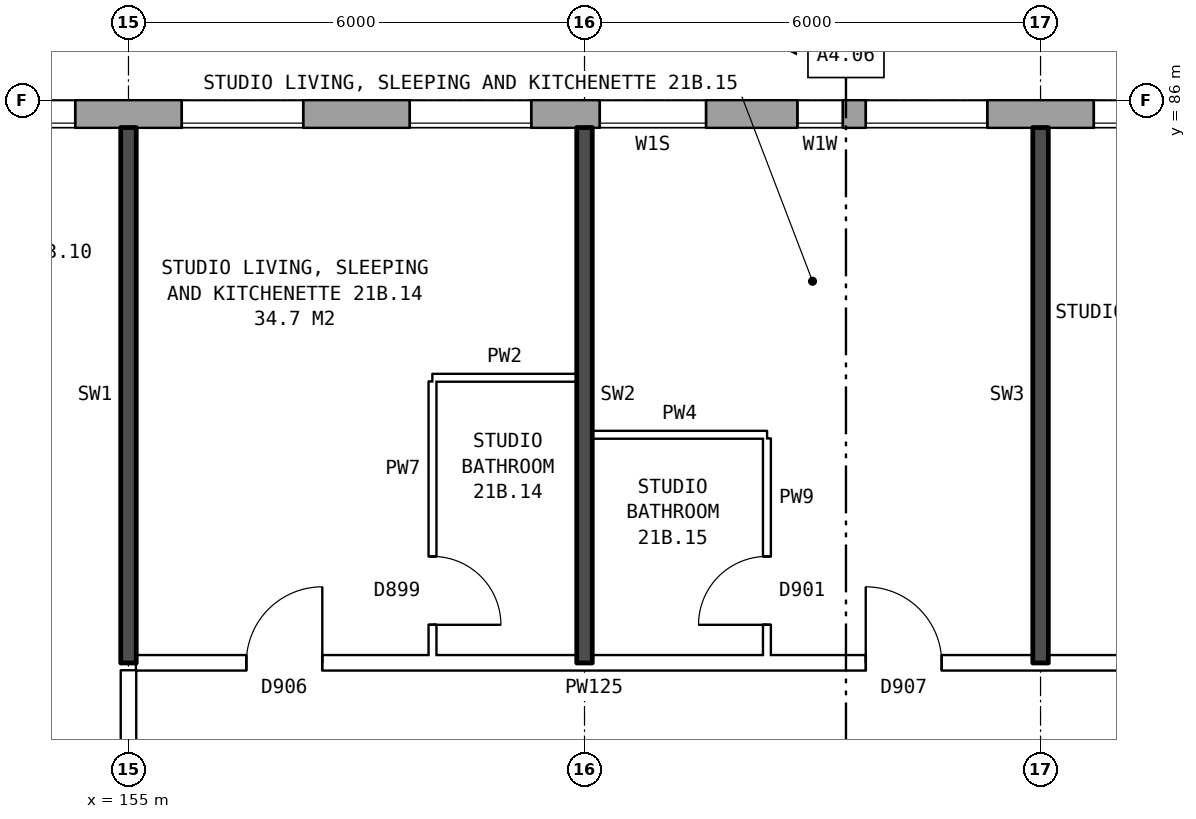
"""IFC4 building model, lengths in metres.
Left out: names, types, materials, properties, quantities, classifications, styles, units other than length and angle.
Written with IfcOpenShell. Run it as: python <this file> out.ifc"""

import sys

from ifc_helpers import new_model, si_unit, direction, frame, frame_2d, origin, place, context, subcontext, project, spatial, rectangle, extrude, element, fill, save


model = new_model("IFC4")
c1 = context("Model", 3, precision=1e-05, world=origin(), true_north=direction((0.0, 1.0)))
c2 = subcontext(c1, "Body", "Model", "MODEL_VIEW")
j1 = project(units=[si_unit("LENGTHUNIT", "METRE"), si_unit("PLANEANGLEUNIT", "RADIAN")], contexts=[c1])
p1 = place(None, origin())
s1 = spatial("IfcSite", under=j1, at=p1, CompositionType="ELEMENT")
p2 = place(p1, origin())
s2 = spatial("IfcBuilding", under=s1, at=p2, CompositionType="ELEMENT")
p3 = place(p2, frame((0.0, 0.0, 77.8)))
s3 = spatial("IfcBuildingStorey", under=s2, at=p3, CompositionType="ELEMENT", Elevation=77.8)
p4 = place(p3, frame((172.175, 85.82, 0.0), z_axis=(0.0, 0.0, 1.0), x_axis=(-1.0, 0.0, 0.0)))
e1 = element("IfcWall", 1, at=p4, inside=s3, PredefinedType="STANDARD", context=c2, shape_type="SweptSolid", body=[
    extrude(rectangle(XDim=38.101, YDim=0.36, at=frame_2d((19.05, 0.0))), origin(), (0.0, 0.0, 1.0), 2.85),
])
p5 = place(p4, frame((2.875, 0.0, 0.8)))
e2 = element("IfcOpeningElement", 2, at=p5, cuts=e1, PredefinedType="OPENING", context=c2, shape_type="SweptSolid", body=[
    extrude(rectangle(XDim=1.6, YDim=1.8, at=frame_2d((0.8, 0.9))), frame((0.0, 0.19, 0.0), z_axis=(0.0, -1.0, 0.0), x_axis=(1.0, 0.0, 0.0)), (0.0, 0.0, 1.0), 0.38),
])
p6 = place(p4, frame((5.875, 0.0, 0.8)))
e3 = element("IfcOpeningElement", 3, at=p6, cuts=e1, PredefinedType="OPENING", context=c2, shape_type="SweptSolid", body=[
    extrude(rectangle(XDim=1.6, YDim=1.8, at=frame_2d((0.8, 0.9))), frame((0.0, 0.19, 0.0), z_axis=(0.0, -1.0, 0.0), x_axis=(1.0, 0.0, 0.0)), (0.0, 0.0, 1.0), 0.38),
])
p7 = place(p4, frame((7.775, 0.0, 1.7)))
e4 = element("IfcOpeningElement", 4, at=p7, cuts=e1, PredefinedType="OPENING", context=c2, shape_type="SweptSolid", body=[
    extrude(rectangle(XDim=0.6, YDim=0.9, at=frame_2d((0.3, 0.45))), frame((0.0, 0.19, 0.0), z_axis=(0.0, -1.0, 0.0), x_axis=(1.0, 0.0, 0.0)), (0.0, 0.0, 1.0), 0.38),
])
p8 = place(p4, frame((11.875, 0.0, 0.8)))
e5 = element("IfcOpeningElement", 5, at=p8, cuts=e1, PredefinedType="OPENING", context=c2, shape_type="SweptSolid", body=[
    extrude(rectangle(XDim=1.6, YDim=1.8, at=frame_2d((0.8, 0.9))), frame((0.0, 0.19, 0.0), z_axis=(0.0, -1.0, 0.0), x_axis=(1.0, 0.0, 0.0)), (0.0, 0.0, 1.0), 0.38),
])
p9 = place(p4, frame((14.875, 0.0, 0.8)))
e6 = element("IfcOpeningElement", 6, at=p9, cuts=e1, PredefinedType="OPENING", context=c2, shape_type="SweptSolid", body=[
    extrude(rectangle(XDim=1.6, YDim=1.8, at=frame_2d((0.8, 0.9))), frame((0.0, 0.19, 0.0), z_axis=(0.0, -1.0, 0.0), x_axis=(1.0, 0.0, 0.0)), (0.0, 0.0, 1.0), 0.38),
])
p10 = place(p4, frame((17.875, 0.0, 0.8)))
e7 = element("IfcOpeningElement", 7, at=p10, cuts=e1, PredefinedType="OPENING", context=c2, shape_type="SweptSolid", body=[
    extrude(rectangle(XDim=1.6, YDim=1.8, at=frame_2d((0.8, 0.9))), frame((0.0, 0.19, 0.0), z_axis=(0.0, -1.0, 0.0), x_axis=(1.0, 0.0, 0.0)), (0.0, 0.0, 1.0), 0.38),
])
p11 = place(p4, frame((20.875, 0.0, 0.8)))
e8 = element("IfcOpeningElement", 8, at=p11, cuts=e1, PredefinedType="OPENING", context=c2, shape_type="SweptSolid", body=[
    extrude(rectangle(XDim=1.6, YDim=1.8, at=frame_2d((0.8, 0.9))), frame((0.0, 0.19, 0.0), z_axis=(0.0, -1.0, 0.0), x_axis=(1.0, 0.0, 0.0)), (0.0, 0.0, 1.0), 0.38),
])
p12 = place(p4, frame((23.875, 0.0, 0.8)))
e9 = element("IfcOpeningElement", 9, at=p12, cuts=e1, PredefinedType="OPENING", context=c2, shape_type="SweptSolid", body=[
    extrude(rectangle(XDim=1.6, YDim=1.8, at=frame_2d((0.8, 0.9))), frame((0.0, 0.19, 0.0), z_axis=(0.0, -1.0, 0.0), x_axis=(1.0, 0.0, 0.0)), (0.0, 0.0, 1.0), 0.38),
])
p13 = place(p4, frame((26.325, 0.0, 0.65)))
e10 = element("IfcOpeningElement", 10, at=p13, cuts=e1, PredefinedType="OPENING", context=c2, shape_type="SweptSolid", body=[
    extrude(rectangle(XDim=1.4, YDim=1.8, at=frame_2d((0.7, 0.9))), frame((0.0, 0.19, 0.0), z_axis=(0.0, -1.0, 0.0), x_axis=(1.0, 0.0, 0.0)), (0.0, 0.0, 1.0), 0.38),
])
p14 = place(p4, frame((29.675, 0.0, 1.7)))
e11 = element("IfcOpeningElement", 11, at=p14, cuts=e1, PredefinedType="OPENING", context=c2, shape_type="SweptSolid", body=[
    extrude(rectangle(XDim=0.8, YDim=0.9, at=frame_2d((0.4, 0.45))), frame((0.0, 0.19, 0.0), z_axis=(0.0, -1.0, 0.0), x_axis=(1.0, 0.0, 0.0)), (0.0, 0.0, 1.0), 0.38),
])
p15 = place(p4, frame((32.875, 0.0, 0.8)))
e12 = element("IfcOpeningElement", 12, at=p15, cuts=e1, PredefinedType="OPENING", context=c2, shape_type="SweptSolid", body=[
    extrude(rectangle(XDim=1.6, YDim=1.8, at=frame_2d((0.8, 0.9))), frame((0.0, 0.19, 0.0), z_axis=(0.0, -1.0, 0.0), x_axis=(1.0, 0.0, 0.0)), (0.0, 0.0, 1.0), 0.38),
])
p16 = place(p4, frame((35.875, 0.0, 0.8)))
e13 = element("IfcOpeningElement", 13, at=p16, cuts=e1, PredefinedType="OPENING", context=c2, shape_type="SweptSolid", body=[
    extrude(rectangle(XDim=1.6, YDim=1.8, at=frame_2d((0.8, 0.9))), frame((0.0, 0.19, 0.0), z_axis=(0.0, -1.0, 0.0), x_axis=(1.0, 0.0, 0.0)), (0.0, 0.0, 1.0), 0.38),
])
p17 = place(p4, frame((9.575, 0.0, 0.8)))
e14 = element("IfcOpeningElement", 14, at=p17, cuts=e1, PredefinedType="OPENING", context=c2, shape_type="SweptSolid", body=[
    extrude(rectangle(XDim=1.4, YDim=0.9, at=frame_2d((0.7, 0.45))), frame((0.0, 0.19, 0.0), z_axis=(0.0, -1.0, 0.0), x_axis=(1.0, 0.0, 0.0)), (0.0, 0.0, 1.0), 0.38),
])
p18 = place(p4, frame((28.025, 0.0, 0.65)))
e15 = element("IfcOpeningElement", 15, at=p18, cuts=e1, PredefinedType="OPENING", context=c2, shape_type="SweptSolid", body=[
    extrude(rectangle(XDim=0.6, YDim=0.9, at=frame_2d((0.3, 0.45))), frame((0.0, 0.19, 0.0), z_axis=(0.0, -1.0, 0.0), x_axis=(1.0, 0.0, 0.0)), (0.0, 0.0, 1.0), 0.38),
])
p19 = place(p4, frame((30.775, 0.0, 0.8)))
e16 = element("IfcOpeningElement", 16, at=p19, cuts=e1, PredefinedType="OPENING", context=c2, shape_type="SweptSolid", body=[
    extrude(rectangle(XDim=1.6, YDim=1.8, at=frame_2d((0.8, 0.9))), frame((0.0, 0.19, 0.0), z_axis=(0.0, -1.0, 0.0), x_axis=(1.0, 0.0, 0.0)), (0.0, 0.0, 1.0), 0.38),
])
p20 = place(p3, frame((155.1, 78.6, 0.0), z_axis=(0.0, 0.0, 1.0), x_axis=(1.0, 0.0, 0.0)))
e17 = element("IfcWall", 17, at=p20, inside=s3, PredefinedType="PARTITIONING", context=c2, shape_type="SweptSolid", body=[
    extrude(rectangle(XDim=19.79, YDim=0.2, at=frame_2d((9.895, 0.0))), origin(), (0.0, 0.0, 1.0), 2.85),
])
p21 = place(p20, frame((1.45, 0.0, 0.0)))
e18 = element("IfcOpeningElement", 18, at=p21, cuts=e17, PredefinedType="OPENING", context=c2, shape_type="SweptSolid", body=[
    extrude(rectangle(XDim=1.0, YDim=2.1, at=frame_2d((0.5, 1.05))), frame((0.0, 0.11, 0.0), z_axis=(0.0, -1.0, 0.0), x_axis=(1.0, 0.0, 0.0)), (0.0, 0.0, 1.0), 0.22),
])
p22 = place(p20, frame((9.6, 0.0, 0.0)))
e19 = element("IfcOpeningElement", 19, at=p22, cuts=e17, PredefinedType="OPENING", context=c2, shape_type="SweptSolid", body=[
    extrude(rectangle(XDim=1.0, YDim=2.1, at=frame_2d((0.5, 1.05))), frame((0.0, 0.11, 0.0), z_axis=(0.0, -1.0, 0.0), x_axis=(1.0, 0.0, 0.0)), (0.0, 0.0, 1.0), 0.22),
])
p23 = place(p20, frame((13.2, 0.0, 0.0)))
e20 = element("IfcOpeningElement", 20, at=p23, cuts=e17, PredefinedType="OPENING", context=c2, shape_type="SweptSolid", body=[
    extrude(rectangle(XDim=1.0, YDim=2.1, at=frame_2d((0.5, 1.05))), frame((0.0, 0.11, 0.0), z_axis=(0.0, -1.0, 0.0), x_axis=(1.0, 0.0, 0.0)), (0.0, 0.0, 1.0), 0.22),
])
p24 = place(p3, frame((161.1, 81.6, 0.0), z_axis=(0.0, 0.0, 1.0), x_axis=(1.0, 0.0, 0.0)))
e21 = element("IfcWall", 21, at=p24, inside=s3, PredefinedType="PARTITIONING", context=c2, shape_type="SweptSolid", body=[
    extrude(rectangle(XDim=2.3, YDim=0.1, at=frame_2d((1.15, 0.0))), origin(), (0.0, 0.0, 1.0), 2.85),
])
p25 = place(p3, frame((159.0, 82.35, 0.0), z_axis=(0.0, 0.0, 1.0), x_axis=(1.0, 0.0, 0.0)))
e22 = element("IfcWall", 22, at=p25, inside=s3, PredefinedType="PARTITIONING", context=c2, shape_type="SweptSolid", body=[
    extrude(rectangle(XDim=1.9, YDim=0.1, at=frame_2d((0.95, 0.0))), origin(), (0.0, 0.0, 1.0), 2.85),
])
p26 = place(p3, frame((155.0, 76.3, 0.0), z_axis=(0.0, 0.0, 1.0), x_axis=(0.0, 1.0, 0.0)))
e23 = element("IfcWall", 23, at=p26, inside=s3, PredefinedType="PARTITIONING", context=c2, shape_type="SweptSolid", body=[
    extrude(rectangle(XDim=2.2, YDim=0.2, at=frame_2d((1.1, 0.0))), origin(), (0.0, 0.0, 1.0), 2.85),
])
p27 = place(p3, frame((155.0, 78.6, 0.0), z_axis=(0.0, 0.0, 1.0), x_axis=(0.0, 1.0, 0.0)))
e24 = element("IfcWall", 24, at=p27, inside=s3, PredefinedType="SOLIDWALL", context=c2, shape_type="SweptSolid", body=[
    extrude(rectangle(XDim=7.04, YDim=0.2, at=frame_2d((3.52, 0.0))), origin(), (0.0, 0.0, 1.0), 2.85),
])
p28 = place(p3, frame((159.0, 78.7, 0.0), z_axis=(0.0, 0.0, 1.0), x_axis=(0.0, 1.0, 0.0)))
e25 = element("IfcWall", 25, at=p28, inside=s3, PredefinedType="PARTITIONING", context=c2, shape_type="SweptSolid", body=[
    extrude(rectangle(XDim=3.6, YDim=0.1, at=frame_2d((1.8, 0.0))), origin(), (0.0, 0.0, 1.0), 2.85),
])
p29 = place(p28, frame((0.4, 0.0, 0.0)))
e26 = element("IfcOpeningElement", 26, at=p29, cuts=e25, PredefinedType="OPENING", context=c2, shape_type="SweptSolid", body=[
    extrude(rectangle(XDim=0.9, YDim=2.1, at=frame_2d((0.45, 1.05))), frame((0.0, 0.06, 0.0), z_axis=(0.0, -1.0, 0.0), x_axis=(1.0, 0.0, 0.0)), (0.0, 0.0, 1.0), 0.12),
])
p30 = place(p3, frame((161.0, 78.6, 0.0), z_axis=(0.0, 0.0, 1.0), x_axis=(0.0, 1.0, 0.0)))
e27 = element("IfcWall", 27, at=p30, inside=s3, PredefinedType="SOLIDWALL", context=c2, shape_type="SweptSolid", body=[
    extrude(rectangle(XDim=7.04, YDim=0.2, at=frame_2d((3.52, 0.0))), origin(), (0.0, 0.0, 1.0), 2.85),
])
p31 = place(p3, frame((163.4, 78.7, 0.0), z_axis=(0.0, 0.0, 1.0), x_axis=(0.0, 1.0, 0.0)))
e28 = element("IfcWall", 28, at=p31, inside=s3, PredefinedType="PARTITIONING", context=c2, shape_type="SweptSolid", body=[
    extrude(rectangle(XDim=2.85, YDim=0.1, at=frame_2d((1.425, 0.0))), origin(), (0.0, 0.0, 1.0), 2.85),
])
p32 = place(p31, frame((0.4, 0.0, 0.0)))
e29 = element("IfcOpeningElement", 29, at=p32, cuts=e28, PredefinedType="OPENING", context=c2, shape_type="SweptSolid", body=[
    extrude(rectangle(XDim=0.9, YDim=2.1, at=frame_2d((0.45, 1.05))), frame((0.0, 0.06, 0.0), z_axis=(0.0, -1.0, 0.0), x_axis=(1.0, 0.0, 0.0)), (0.0, 0.0, 1.0), 0.12),
])
p33 = place(p3, frame((167.0, 78.6, 0.0), z_axis=(0.0, 0.0, 1.0), x_axis=(0.0, 1.0, 0.0)))
e30 = element("IfcWall", 30, at=p33, inside=s3, PredefinedType="SOLIDWALL", context=c2, shape_type="SweptSolid", body=[
    extrude(rectangle(XDim=7.04, YDim=0.2, at=frame_2d((3.52, 0.0))), origin(), (0.0, 0.0, 1.0), 2.85),
])
p34 = place(p5, origin())
e31 = element("IfcWindow", 31, at=p34, inside=s3, PartitioningType="SINGLE_PANEL", PredefinedType="WINDOW", context=c2, shape_type="SweptSolid", body=[
    extrude(rectangle(XDim=1.6, YDim=1.8, at=frame_2d((0.8, 0.9))), frame((0.0, 0.15, 0.0), z_axis=(0.0, -1.0, 0.0), x_axis=(1.0, 0.0, 0.0)), (0.0, 0.0, 1.0), 0.06),
])
fill(e2, e31)
p35 = place(p6, origin())
e32 = element("IfcWindow", 32, at=p35, inside=s3, PartitioningType="SINGLE_PANEL", PredefinedType="WINDOW", context=c2, shape_type="SweptSolid", body=[
    extrude(rectangle(XDim=1.6, YDim=1.8, at=frame_2d((0.8, 0.9))), frame((0.0, 0.15, 0.0), z_axis=(0.0, -1.0, 0.0), x_axis=(1.0, 0.0, 0.0)), (0.0, 0.0, 1.0), 0.06),
])
fill(e3, e32)
p36 = place(p7, origin())
e33 = element("IfcWindow", 33, at=p36, inside=s3, PartitioningType="SINGLE_PANEL", PredefinedType="WINDOW", context=c2, shape_type="SweptSolid", body=[
    extrude(rectangle(XDim=0.6, YDim=0.9, at=frame_2d((0.3, 0.45))), frame((0.0, 0.15, 0.0), z_axis=(0.0, -1.0, 0.0), x_axis=(1.0, 0.0, 0.0)), (0.0, 0.0, 1.0), 0.06),
])
fill(e4, e33)
p37 = place(p8, origin())
e34 = element("IfcWindow", 34, at=p37, inside=s3, PartitioningType="SINGLE_PANEL", PredefinedType="WINDOW", context=c2, shape_type="SweptSolid", body=[
    extrude(rectangle(XDim=1.6, YDim=1.8, at=frame_2d((0.8, 0.9))), frame((0.0, 0.15, 0.0), z_axis=(0.0, -1.0, 0.0), x_axis=(1.0, 0.0, 0.0)), (0.0, 0.0, 1.0), 0.06),
])
fill(e5, e34)
p38 = place(p9, origin())
e35 = element("IfcWindow", 35, at=p38, inside=s3, PartitioningType="SINGLE_PANEL", PredefinedType="WINDOW", context=c2, shape_type="SweptSolid", body=[
    extrude(rectangle(XDim=1.6, YDim=1.8, at=frame_2d((0.8, 0.9))), frame((0.0, 0.15, 0.0), z_axis=(0.0, -1.0, 0.0), x_axis=(1.0, 0.0, 0.0)), (0.0, 0.0, 1.0), 0.06),
])
fill(e6, e35)
p39 = place(p10, origin())
e36 = element("IfcWindow", 36, at=p39, inside=s3, PartitioningType="SINGLE_PANEL", PredefinedType="WINDOW", context=c2, shape_type="SweptSolid", body=[
    extrude(rectangle(XDim=1.6, YDim=1.8, at=frame_2d((0.8, 0.9))), frame((0.0, 0.15, 0.0), z_axis=(0.0, -1.0, 0.0), x_axis=(1.0, 0.0, 0.0)), (0.0, 0.0, 1.0), 0.06),
])
fill(e7, e36)
p40 = place(p21, origin())
e37 = element("IfcDoor", 37, at=p40, inside=s3, OperationType="SINGLE_SWING_RIGHT", PredefinedType="DOOR", context=c2, shape_type="SweptSolid", body=[
    extrude(rectangle(XDim=1.0, YDim=2.1, at=frame_2d((0.5, 1.05))), frame((0.0, 0.025, 0.0), z_axis=(0.0, -1.0, 0.0), x_axis=(1.0, 0.0, 0.0)), (0.0, 0.0, 1.0), 0.05),
])
fill(e18, e37)
p41 = place(p29, frame((0.9, 0.0, 0.0), z_axis=(0.0, 0.0, 1.0), x_axis=(-1.0, 0.0, 0.0)))
e38 = element("IfcDoor", 38, at=p41, inside=s3, OperationType="SINGLE_SWING_RIGHT", PredefinedType="DOOR", context=c2, shape_type="SweptSolid", body=[
    extrude(rectangle(XDim=0.9, YDim=2.1, at=frame_2d((0.45, 1.05))), frame((0.0, 0.025, 0.0), z_axis=(0.0, -1.0, 0.0), x_axis=(1.0, 0.0, 0.0)), (0.0, 0.0, 1.0), 0.05),
])
fill(e26, e38)
p42 = place(p22, origin())
e39 = element("IfcDoor", 39, at=p42, inside=s3, OperationType="SINGLE_SWING_LEFT", PredefinedType="DOOR", context=c2, shape_type="SweptSolid", body=[
    extrude(rectangle(XDim=1.0, YDim=2.1, at=frame_2d((0.5, 1.05))), frame((0.0, 0.025, 0.0), z_axis=(0.0, -1.0, 0.0), x_axis=(1.0, 0.0, 0.0)), (0.0, 0.0, 1.0), 0.05),
])
fill(e19, e39)
p43 = place(p32, origin())
e40 = element("IfcDoor", 40, at=p43, inside=s3, OperationType="SINGLE_SWING_LEFT", PredefinedType="DOOR", context=c2, shape_type="SweptSolid", body=[
    extrude(rectangle(XDim=0.9, YDim=2.1, at=frame_2d((0.45, 1.05))), frame((0.0, 0.025, 0.0), z_axis=(0.0, -1.0, 0.0), x_axis=(1.0, 0.0, 0.0)), (0.0, 0.0, 1.0), 0.05),
])
fill(e29, e40)
p44 = place(p17, origin())
e41 = element("IfcWindow", 41, at=p44, inside=s3, PartitioningType="SINGLE_PANEL", PredefinedType="WINDOW", context=c2, shape_type="SweptSolid", body=[
    extrude(rectangle(XDim=1.4, YDim=0.9, at=frame_2d((0.7, 0.45))), frame((0.0, 0.15, 0.0), z_axis=(0.0, -1.0, 0.0), x_axis=(1.0, 0.0, 0.0)), (0.0, 0.0, 1.0), 0.06),
])
fill(e14, e41)
save(model, sys.argv[1])
